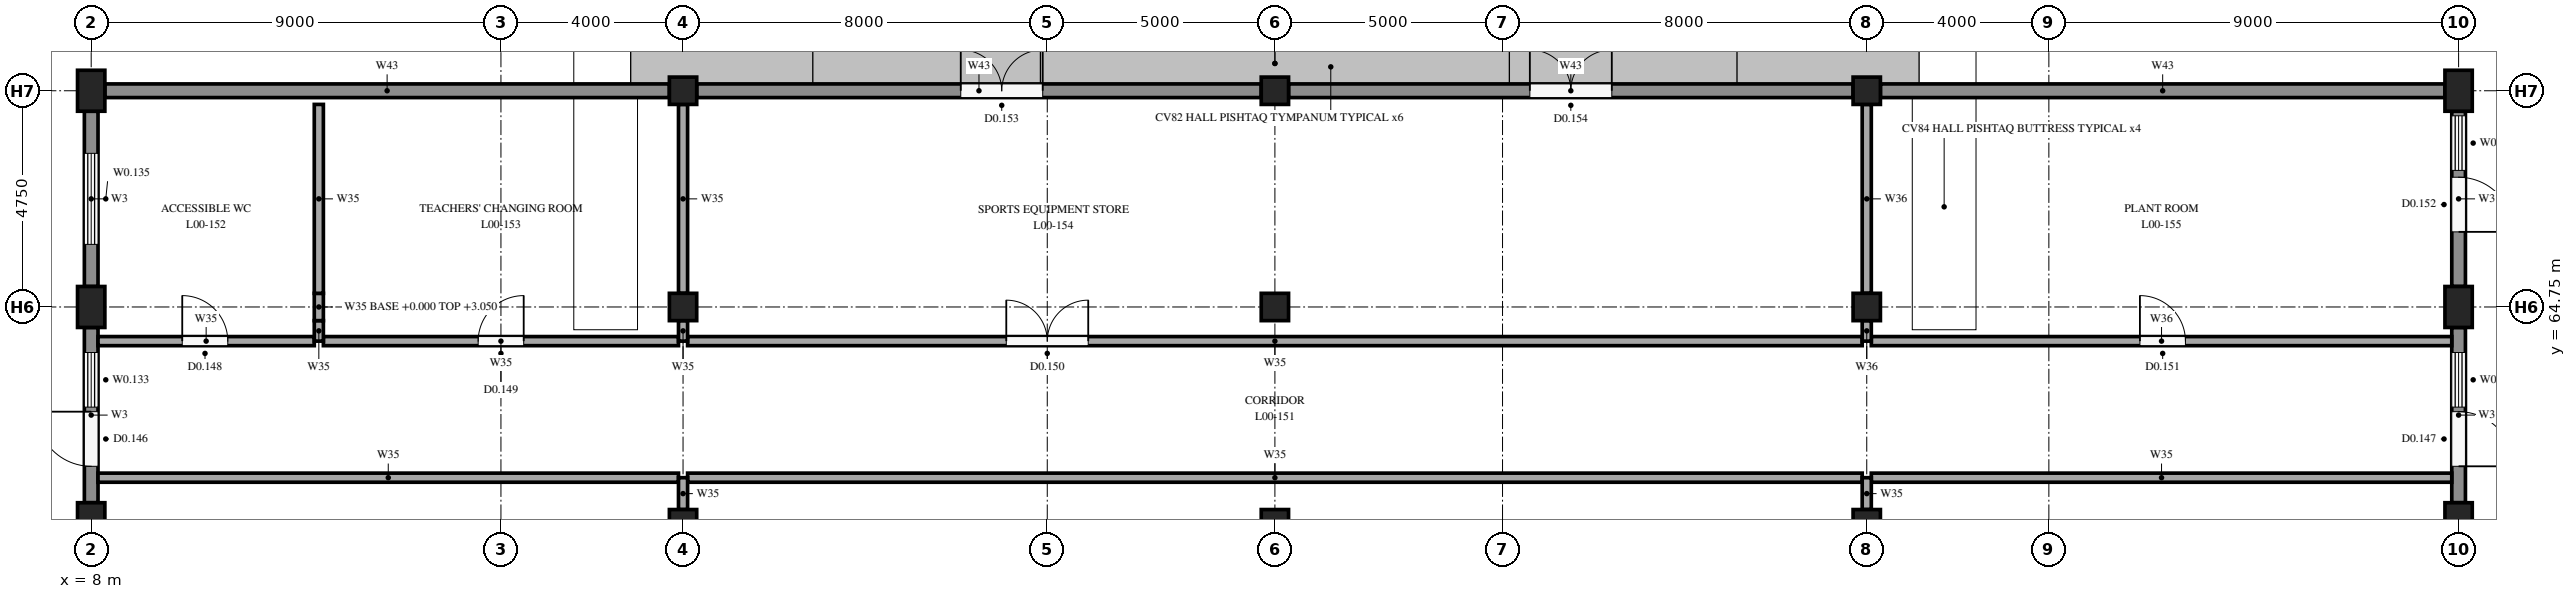
"""IFC4 building model, lengths in metres.
Left out: names, types, materials, properties, quantities, classifications, styles, units other than length and angle.
Written with IfcOpenShell. Run it as: python <this file> out.ifc"""

import sys

from ifc_helpers import new_model, si_unit, direction, frame, frame_2d, origin, origin_2d, place, context, subcontext, project, spatial, rectangle, extrude, element, fill, save


model = new_model("IFC4")
c1 = context("Model", 3, precision=1e-05, world=origin(), true_north=direction((0.0, 1.0)))
c2 = subcontext(c1, "Body", "Model", "MODEL_VIEW")
j1 = project(units=[si_unit("LENGTHUNIT", "METRE"), si_unit("PLANEANGLEUNIT", "RADIAN")], contexts=[c1])
p1 = place(None, origin())
s1 = spatial("IfcSite", under=j1, at=p1, CompositionType="ELEMENT")
p2 = place(p1, origin())
s2 = spatial("IfcBuilding", under=s1, at=p2, CompositionType="ELEMENT")
p3 = place(p2, origin())
s3 = spatial("IfcBuildingStorey", under=s2, at=p3, CompositionType="ELEMENT", Elevation=0.0)
for number, where, z_axis, x_axis in (
    (1, (8.0, 60.0, 0.0), (0.0, 0.0, 1.0), (1.0, 0.0, 0.0)),
    (2, (8.0, 64.75, 0.0), (0.0, 0.0, 1.0), (1.0, 0.0, 0.0)),
    (3, (8.0, 69.5, 0.0), (0.0, 0.0, 1.0), (1.0, 0.0, 0.0)),
    (4, (60.0, 60.0, 0.0), (0.0, 0.0, 1.0), (1.0, 0.0, 0.0)),
    (5, (60.0, 64.75, 0.0), (0.0, 0.0, 1.0), (1.0, 0.0, 0.0)),
    (6, (60.0, 69.5, 0.0), (0.0, 0.0, 1.0), (1.0, 0.0, 0.0)),
):
    element("IfcColumn", number, at=place(p3, frame(where, z_axis=z_axis, x_axis=x_axis)), inside=s3, PredefinedType="COLUMN", context=c2, shape_type="SweptSolid", body=[
        extrude(rectangle(XDim=0.6, YDim=0.9, at=origin_2d()), origin(), (0.0, 0.0, 1.0), 4.5),
    ])
for number, where, z_axis, x_axis in (
    (7, (21.0, 60.0, 0.0), (0.0, 0.0, 1.0), (1.0, 0.0, 0.0)),
    (8, (21.0, 64.75, 0.0), (0.0, 0.0, 1.0), (1.0, 0.0, 0.0)),
    (9, (21.0, 69.5, 0.0), (0.0, 0.0, 1.0), (1.0, 0.0, 0.0)),
    (10, (34.0, 60.0, 0.0), (0.0, 0.0, 1.0), (1.0, 0.0, 0.0)),
    (11, (34.0, 64.75, 0.0), (0.0, 0.0, 1.0), (1.0, 0.0, 0.0)),
    (12, (34.0, 69.5, 0.0), (0.0, 0.0, 1.0), (1.0, 0.0, 0.0)),
    (13, (47.0, 60.0, 0.0), (0.0, 0.0, 1.0), (1.0, 0.0, 0.0)),
    (14, (47.0, 64.75, 0.0), (0.0, 0.0, 1.0), (1.0, 0.0, 0.0)),
    (15, (47.0, 69.5, 0.0), (0.0, 0.0, 1.0), (1.0, 0.0, 0.0)),
):
    element("IfcColumn", number, at=place(p3, frame(where, z_axis=z_axis, x_axis=x_axis)), inside=s3, PredefinedType="COLUMN", context=c2, shape_type="SweptSolid", body=[
        extrude(rectangle(XDim=0.6, YDim=0.6, at=origin_2d()), origin(), (0.0, 0.0, 1.0), 4.5),
    ])
p4 = place(p3, frame((8.0, 60.45, 0.0), z_axis=(0.0, 0.0, 1.0), x_axis=(0.0, 1.0, 0.0)))
e16 = element("IfcWall", 16, at=p4, inside=s3, PredefinedType="SOLIDWALL", context=c2, shape_type="SweptSolid", body=[
    extrude(rectangle(XDim=3.85, YDim=0.3, at=frame_2d((1.925, 0.0))), origin(), (0.0, 0.0, 1.0), 4.15),
])
p5 = place(p4, frame((2.1, 0.0, 1.0)))
e17 = element("IfcOpeningElement", 17, at=p5, cuts=e16, PredefinedType="OPENING", context=c2, shape_type="SweptSolid", body=[
    extrude(rectangle(XDim=1.2, YDim=2.0, at=frame_2d((0.6, 1.0))), frame((0.0, 0.16, 0.0), z_axis=(0.0, -1.0, 0.0), x_axis=(1.0, 0.0, 0.0)), (0.0, 0.0, 1.0), 0.32),
])
p6 = place(p4, frame((0.8, 0.0, 0.0)))
e18 = element("IfcOpeningElement", 18, at=p6, cuts=e16, PredefinedType="OPENING", context=c2, shape_type="SweptSolid", body=[
    extrude(rectangle(XDim=1.2, YDim=2.1, at=frame_2d((0.6, 1.05))), frame((0.0, 0.16, 0.0), z_axis=(0.0, -1.0, 0.0), x_axis=(1.0, 0.0, 0.0)), (0.0, 0.0, 1.0), 0.32),
])
p7 = place(p3, frame((8.0, 65.2, 0.0), z_axis=(0.0, 0.0, 1.0), x_axis=(0.0, 1.0, 0.0)))
e19 = element("IfcWall", 19, at=p7, inside=s3, PredefinedType="SOLIDWALL", context=c2, shape_type="SweptSolid", body=[
    extrude(rectangle(XDim=3.85, YDim=0.3, at=frame_2d((1.925, 0.0))), origin(), (0.0, 0.0, 1.0), 4.15),
])
p8 = place(p7, frame((0.925, 0.0, 1.0)))
e20 = element("IfcOpeningElement", 20, at=p8, cuts=e19, PredefinedType="OPENING", context=c2, shape_type="SweptSolid", body=[
    extrude(rectangle(XDim=2.0, YDim=2.0, at=frame_2d((1.0, 1.0))), frame((0.0, 0.16, 0.0), z_axis=(0.0, -1.0, 0.0), x_axis=(1.0, 0.0, 0.0)), (0.0, 0.0, 1.0), 0.32),
])
p9 = place(p3, frame((60.0, 60.45, 0.0), z_axis=(0.0, 0.0, 1.0), x_axis=(0.0, 1.0, 0.0)))
e21 = element("IfcWall", 21, at=p9, inside=s3, PredefinedType="SOLIDWALL", context=c2, shape_type="SweptSolid", body=[
    extrude(rectangle(XDim=3.85, YDim=0.3, at=frame_2d((1.925, 0.0))), origin(), (0.0, 0.0, 1.0), 4.15),
])
p10 = place(p9, frame((2.1, 0.0, 1.0)))
e22 = element("IfcOpeningElement", 22, at=p10, cuts=e21, PredefinedType="OPENING", context=c2, shape_type="SweptSolid", body=[
    extrude(rectangle(XDim=1.2, YDim=2.0, at=frame_2d((0.6, 1.0))), frame((0.0, 0.16, 0.0), z_axis=(0.0, -1.0, 0.0), x_axis=(1.0, 0.0, 0.0)), (0.0, 0.0, 1.0), 0.32),
])
p11 = place(p9, frame((0.8, 0.0, 0.0)))
e23 = element("IfcOpeningElement", 23, at=p11, cuts=e21, PredefinedType="OPENING", context=c2, shape_type="SweptSolid", body=[
    extrude(rectangle(XDim=1.2, YDim=2.1, at=frame_2d((0.6, 1.05))), frame((0.0, 0.16, 0.0), z_axis=(0.0, -1.0, 0.0), x_axis=(1.0, 0.0, 0.0)), (0.0, 0.0, 1.0), 0.32),
])
p12 = place(p3, frame((60.0, 65.2, 0.0), z_axis=(0.0, 0.0, 1.0), x_axis=(0.0, 1.0, 0.0)))
e24 = element("IfcWall", 24, at=p12, inside=s3, PredefinedType="SOLIDWALL", context=c2, shape_type="SweptSolid", body=[
    extrude(rectangle(XDim=3.85, YDim=0.3, at=frame_2d((1.925, 0.0))), origin(), (0.0, 0.0, 1.0), 4.15),
])
p13 = place(p12, frame((2.55, 0.0, 1.0)))
e25 = element("IfcOpeningElement", 25, at=p13, cuts=e24, PredefinedType="OPENING", context=c2, shape_type="SweptSolid", body=[
    extrude(rectangle(XDim=1.2, YDim=2.0, at=frame_2d((0.6, 1.0))), frame((0.0, 0.16, 0.0), z_axis=(0.0, -1.0, 0.0), x_axis=(1.0, 0.0, 0.0)), (0.0, 0.0, 1.0), 0.32),
])
p14 = place(p12, frame((1.2, 0.0, 0.0)))
e26 = element("IfcOpeningElement", 26, at=p14, cuts=e24, PredefinedType="OPENING", context=c2, shape_type="SweptSolid", body=[
    extrude(rectangle(XDim=1.2, YDim=2.1, at=frame_2d((0.6, 1.05))), frame((0.0, 0.16, 0.0), z_axis=(0.0, -1.0, 0.0), x_axis=(1.0, 0.0, 0.0)), (0.0, 0.0, 1.0), 0.32),
])
p15 = place(p3, frame((8.3, 69.5, 0.0), z_axis=(0.0, 0.0, 1.0), x_axis=(1.0, 0.0, 0.0)))
e27 = element("IfcWall", 27, at=p15, inside=s3, PredefinedType="SOLIDWALL", context=c2, shape_type="SweptSolid", body=[
    extrude(rectangle(XDim=12.4, YDim=0.3, at=frame_2d((6.2, 0.0))), origin(), (0.0, 0.0, 1.0), 3.05),
])
p16 = place(p3, frame((21.3, 69.5, 0.0), z_axis=(0.0, 0.0, 1.0), x_axis=(1.0, 0.0, 0.0)))
e28 = element("IfcWall", 28, at=p16, inside=s3, PredefinedType="SOLIDWALL", context=c2, shape_type="SweptSolid", body=[
    extrude(rectangle(XDim=12.4, YDim=0.3, at=frame_2d((6.2, 0.0))), origin(), (0.0, 0.0, 1.0), 3.05),
])
p17 = place(p16, frame((5.8, 0.0, 0.0)))
e29 = element("IfcOpeningElement", 29, at=p17, cuts=e28, PredefinedType="OPENING", context=c2, shape_type="SweptSolid", body=[
    extrude(rectangle(XDim=1.8, YDim=2.1, at=frame_2d((0.9, 1.05))), frame((0.0, 0.16, 0.0), z_axis=(0.0, -1.0, 0.0), x_axis=(1.0, 0.0, 0.0)), (0.0, 0.0, 1.0), 0.32),
])
p18 = place(p3, frame((34.3, 69.5, 0.0), z_axis=(0.0, 0.0, 1.0), x_axis=(1.0, 0.0, 0.0)))
e30 = element("IfcWall", 30, at=p18, inside=s3, PredefinedType="SOLIDWALL", context=c2, shape_type="SweptSolid", body=[
    extrude(rectangle(XDim=12.4, YDim=0.3, at=frame_2d((6.2, 0.0))), origin(), (0.0, 0.0, 1.0), 3.05),
])
p19 = place(p18, frame((5.3, 0.0, 0.0)))
e31 = element("IfcOpeningElement", 31, at=p19, cuts=e30, PredefinedType="OPENING", context=c2, shape_type="SweptSolid", body=[
    extrude(rectangle(XDim=1.8, YDim=2.1, at=frame_2d((0.9, 1.05))), frame((0.0, 0.16, 0.0), z_axis=(0.0, -1.0, 0.0), x_axis=(1.0, 0.0, 0.0)), (0.0, 0.0, 1.0), 0.32),
])
p20 = place(p3, frame((47.3, 69.5, 0.0), z_axis=(0.0, 0.0, 1.0), x_axis=(1.0, 0.0, 0.0)))
e32 = element("IfcWall", 32, at=p20, inside=s3, PredefinedType="SOLIDWALL", context=c2, shape_type="SweptSolid", body=[
    extrude(rectangle(XDim=12.4, YDim=0.3, at=frame_2d((6.2, 0.0))), origin(), (0.0, 0.0, 1.0), 3.05),
])
p21 = place(p3, frame((8.15, 61.0, 0.0), z_axis=(0.0, 0.0, 1.0), x_axis=(1.0, 0.0, 0.0)))
e33 = element("IfcWall", 33, at=p21, inside=s3, PredefinedType="PARTITIONING", context=c2, shape_type="SweptSolid", body=[
    extrude(rectangle(XDim=12.75, YDim=0.2, at=frame_2d((6.375, 0.0))), origin(), (0.0, 0.0, 1.0), 4.15),
])
p22 = place(p3, frame((21.1, 61.0, 0.0), z_axis=(0.0, 0.0, 1.0), x_axis=(1.0, 0.0, 0.0)))
e34 = element("IfcWall", 34, at=p22, inside=s3, PredefinedType="PARTITIONING", context=c2, shape_type="SweptSolid", body=[
    extrude(rectangle(XDim=25.8, YDim=0.2, at=frame_2d((12.9, 0.0))), origin(), (0.0, 0.0, 1.0), 4.15),
])
p23 = place(p3, frame((47.1, 61.0, 0.0), z_axis=(0.0, 0.0, 1.0), x_axis=(1.0, 0.0, 0.0)))
e35 = element("IfcWall", 35, at=p23, inside=s3, PredefinedType="PARTITIONING", context=c2, shape_type="SweptSolid", body=[
    extrude(rectangle(XDim=12.75, YDim=0.2, at=frame_2d((6.375, 0.0))), origin(), (0.0, 0.0, 1.0), 4.15),
])
p24 = place(p3, frame((8.15, 64.0, 0.0), z_axis=(0.0, 0.0, 1.0), x_axis=(1.0, 0.0, 0.0)))
e36 = element("IfcWall", 36, at=p24, inside=s3, PredefinedType="PARTITIONING", context=c2, shape_type="SweptSolid", body=[
    extrude(rectangle(XDim=4.75, YDim=0.2, at=frame_2d((2.375, 0.0))), origin(), (0.0, 0.0, 1.0), 4.15),
])
p25 = place(p24, frame((1.85, 0.0, 0.0)))
e37 = element("IfcOpeningElement", 37, at=p25, cuts=e36, PredefinedType="OPENING", context=c2, shape_type="SweptSolid", body=[
    extrude(rectangle(XDim=1.0, YDim=2.1, at=frame_2d((0.5, 1.05))), frame((0.0, 0.11, 0.0), z_axis=(0.0, -1.0, 0.0), x_axis=(1.0, 0.0, 0.0)), (0.0, 0.0, 1.0), 0.22),
])
p26 = place(p3, frame((13.1, 64.0, 0.0), z_axis=(0.0, 0.0, 1.0), x_axis=(1.0, 0.0, 0.0)))
e38 = element("IfcWall", 38, at=p26, inside=s3, PredefinedType="PARTITIONING", context=c2, shape_type="SweptSolid", body=[
    extrude(rectangle(XDim=7.8, YDim=0.2, at=frame_2d((3.9, 0.0))), origin(), (0.0, 0.0, 1.0), 4.15),
])
p27 = place(p26, frame((3.4, 0.0, 0.0)))
e39 = element("IfcOpeningElement", 39, at=p27, cuts=e38, PredefinedType="OPENING", context=c2, shape_type="SweptSolid", body=[
    extrude(rectangle(XDim=1.0, YDim=2.1, at=frame_2d((0.5, 1.05))), frame((0.0, 0.11, 0.0), z_axis=(0.0, -1.0, 0.0), x_axis=(1.0, 0.0, 0.0)), (0.0, 0.0, 1.0), 0.22),
])
p28 = place(p3, frame((21.1, 64.0, 0.0), z_axis=(0.0, 0.0, 1.0), x_axis=(1.0, 0.0, 0.0)))
e40 = element("IfcWall", 40, at=p28, inside=s3, PredefinedType="PARTITIONING", context=c2, shape_type="SweptSolid", body=[
    extrude(rectangle(XDim=25.8, YDim=0.2, at=frame_2d((12.9, 0.0))), origin(), (0.0, 0.0, 1.0), 4.15),
])
p29 = place(p28, frame((7.0, 0.0, 0.0)))
e41 = element("IfcOpeningElement", 41, at=p29, cuts=e40, PredefinedType="OPENING", context=c2, shape_type="SweptSolid", body=[
    extrude(rectangle(XDim=1.8, YDim=2.1, at=frame_2d((0.9, 1.05))), frame((0.0, 0.11, 0.0), z_axis=(0.0, -1.0, 0.0), x_axis=(1.0, 0.0, 0.0)), (0.0, 0.0, 1.0), 0.22),
])
p30 = place(p3, frame((47.1, 64.0, 0.0), z_axis=(0.0, 0.0, 1.0), x_axis=(1.0, 0.0, 0.0)))
e42 = element("IfcWall", 42, at=p30, inside=s3, PredefinedType="PARTITIONING", context=c2, shape_type="SweptSolid", body=[
    extrude(rectangle(XDim=12.75, YDim=0.2, at=frame_2d((6.375, 0.0))), origin(), (0.0, 0.0, 1.0), 4.15),
])
p31 = place(p30, frame((5.9, 0.0, 0.0)))
e43 = element("IfcOpeningElement", 43, at=p31, cuts=e42, PredefinedType="OPENING", context=c2, shape_type="SweptSolid", body=[
    extrude(rectangle(XDim=1.0, YDim=2.1, at=frame_2d((0.5, 1.05))), frame((0.0, 0.11, 0.0), z_axis=(0.0, -1.0, 0.0), x_axis=(1.0, 0.0, 0.0)), (0.0, 0.0, 1.0), 0.22),
])
p32 = place(p3, frame((13.0, 64.0, 0.0), z_axis=(0.0, 0.0, 1.0), x_axis=(0.0, 1.0, 0.0)))
e44 = element("IfcWall", 44, at=p32, inside=s3, PredefinedType="PARTITIONING", context=c2, shape_type="SweptSolid", body=[
    extrude(rectangle(XDim=0.45, YDim=0.2, at=frame_2d((0.225, 0.0))), origin(), (0.0, 0.0, 1.0), 4.15),
])
p33 = place(p3, frame((13.0, 64.45, 0.0), z_axis=(0.0, 0.0, 1.0), x_axis=(0.0, 1.0, 0.0)))
e45 = element("IfcWall", 45, at=p33, inside=s3, PredefinedType="PARTITIONING", context=c2, shape_type="SweptSolid", body=[
    extrude(rectangle(XDim=0.6, YDim=0.2, at=frame_2d((0.3, 0.0))), origin(), (0.0, 0.0, 1.0), 3.05),
])
p34 = place(p3, frame((13.0, 65.05, 0.0), z_axis=(0.0, 0.0, 1.0), x_axis=(0.0, 1.0, 0.0)))
e46 = element("IfcWall", 46, at=p34, inside=s3, PredefinedType="PARTITIONING", context=c2, shape_type="SweptSolid", body=[
    extrude(rectangle(XDim=4.15, YDim=0.2, at=frame_2d((2.075, 0.0))), origin(), (0.0, 0.0, 1.0), 4.15),
])
p35 = place(p3, frame((21.0, 60.3, 0.0), z_axis=(0.0, 0.0, 1.0), x_axis=(0.0, 1.0, 0.0)))
e47 = element("IfcWall", 47, at=p35, inside=s3, PredefinedType="PARTITIONING", context=c2, shape_type="SweptSolid", body=[
    extrude(rectangle(XDim=0.7, YDim=0.2, at=frame_2d((0.35, 0.0))), origin(), (0.0, 0.0, 1.0), 4.15),
])
p36 = place(p3, frame((21.0, 64.0, 0.0), z_axis=(0.0, 0.0, 1.0), x_axis=(0.0, 1.0, 0.0)))
e48 = element("IfcWall", 48, at=p36, inside=s3, PredefinedType="PARTITIONING", context=c2, shape_type="SweptSolid", body=[
    extrude(rectangle(XDim=0.45, YDim=0.2, at=frame_2d((0.225, 0.0))), origin(), (0.0, 0.0, 1.0), 4.15),
])
p37 = place(p3, frame((21.0, 65.05, 0.0), z_axis=(0.0, 0.0, 1.0), x_axis=(0.0, 1.0, 0.0)))
e49 = element("IfcWall", 49, at=p37, inside=s3, PredefinedType="PARTITIONING", context=c2, shape_type="SweptSolid", body=[
    extrude(rectangle(XDim=4.15, YDim=0.2, at=frame_2d((2.075, 0.0))), origin(), (0.0, 0.0, 1.0), 4.15),
])
p38 = place(p3, frame((47.0, 60.3, 0.0), z_axis=(0.0, 0.0, 1.0), x_axis=(0.0, 1.0, 0.0)))
e50 = element("IfcWall", 50, at=p38, inside=s3, PredefinedType="PARTITIONING", context=c2, shape_type="SweptSolid", body=[
    extrude(rectangle(XDim=0.7, YDim=0.2, at=frame_2d((0.35, 0.0))), origin(), (0.0, 0.0, 1.0), 4.15),
])
p39 = place(p3, frame((47.0, 64.0, 0.0), z_axis=(0.0, 0.0, 1.0), x_axis=(0.0, 1.0, 0.0)))
e51 = element("IfcWall", 51, at=p39, inside=s3, PredefinedType="PARTITIONING", context=c2, shape_type="SweptSolid", body=[
    extrude(rectangle(XDim=0.45, YDim=0.2, at=frame_2d((0.225, 0.0))), origin(), (0.0, 0.0, 1.0), 4.15),
])
p40 = place(p3, frame((47.0, 65.05, 0.0), z_axis=(0.0, 0.0, 1.0), x_axis=(0.0, 1.0, 0.0)))
e52 = element("IfcWall", 52, at=p40, inside=s3, PredefinedType="PARTITIONING", context=c2, shape_type="SweptSolid", body=[
    extrude(rectangle(XDim=4.15, YDim=0.2, at=frame_2d((2.075, 0.0))), origin(), (0.0, 0.0, 1.0), 4.15),
])
p41 = place(p5, origin())
e53 = element("IfcWindow", 53, at=p41, inside=s3, PartitioningType="SINGLE_PANEL", PredefinedType="WINDOW", context=c2, shape_type="SweptSolid", body=[
    extrude(rectangle(XDim=1.2, YDim=2.0, at=frame_2d((0.6, 1.0))), frame((0.0, 0.03, 0.0), z_axis=(0.0, -1.0, 0.0), x_axis=(1.0, 0.0, 0.0)), (0.0, 0.0, 1.0), 0.06),
])
fill(e17, e53)
p42 = place(p8, origin())
e54 = element("IfcWindow", 54, at=p42, inside=s3, PartitioningType="SINGLE_PANEL", PredefinedType="WINDOW", context=c2, shape_type="SweptSolid", body=[
    extrude(rectangle(XDim=2.0, YDim=2.0, at=frame_2d((1.0, 1.0))), frame((0.0, 0.03, 0.0), z_axis=(0.0, -1.0, 0.0), x_axis=(1.0, 0.0, 0.0)), (0.0, 0.0, 1.0), 0.06),
])
fill(e20, e54)
p43 = place(p10, origin())
e55 = element("IfcWindow", 55, at=p43, inside=s3, PartitioningType="SINGLE_PANEL", PredefinedType="WINDOW", context=c2, shape_type="SweptSolid", body=[
    extrude(rectangle(XDim=1.2, YDim=2.0, at=frame_2d((0.6, 1.0))), frame((0.0, 0.03, 0.0), z_axis=(0.0, -1.0, 0.0), x_axis=(1.0, 0.0, 0.0)), (0.0, 0.0, 1.0), 0.06),
])
fill(e22, e55)
p44 = place(p13, origin())
e56 = element("IfcWindow", 56, at=p44, inside=s3, PartitioningType="SINGLE_PANEL", PredefinedType="WINDOW", context=c2, shape_type="SweptSolid", body=[
    extrude(rectangle(XDim=1.2, YDim=2.0, at=frame_2d((0.6, 1.0))), frame((0.0, 0.03, 0.0), z_axis=(0.0, -1.0, 0.0), x_axis=(1.0, 0.0, 0.0)), (0.0, 0.0, 1.0), 0.06),
])
fill(e25, e56)
p45 = place(p6, origin())
e57 = element("IfcDoor", 57, at=p45, inside=s3, OperationType="SINGLE_SWING_RIGHT", PredefinedType="DOOR", context=c2, shape_type="SweptSolid", body=[
    extrude(rectangle(XDim=1.2, YDim=2.1, at=frame_2d((0.6, 1.05))), frame((0.0, 0.025, 0.0), z_axis=(0.0, -1.0, 0.0), x_axis=(1.0, 0.0, 0.0)), (0.0, 0.0, 1.0), 0.05),
])
fill(e18, e57)
p46 = place(p11, frame((1.2, 0.0, 0.0), z_axis=(0.0, 0.0, 1.0), x_axis=(-1.0, 0.0, 0.0)))
e58 = element("IfcDoor", 58, at=p46, inside=s3, OperationType="SINGLE_SWING_LEFT", PredefinedType="DOOR", context=c2, shape_type="SweptSolid", body=[
    extrude(rectangle(XDim=1.2, YDim=2.1, at=frame_2d((0.6, 1.05))), frame((0.0, 0.025, 0.0), z_axis=(0.0, -1.0, 0.0), x_axis=(1.0, 0.0, 0.0)), (0.0, 0.0, 1.0), 0.05),
])
fill(e23, e58)
p47 = place(p14, frame((1.2, 0.0, 0.0), z_axis=(0.0, 0.0, 1.0), x_axis=(-1.0, 0.0, 0.0)))
e59 = element("IfcDoor", 59, at=p47, inside=s3, OperationType="SINGLE_SWING_LEFT", PredefinedType="DOOR", context=c2, shape_type="SweptSolid", body=[
    extrude(rectangle(XDim=1.2, YDim=2.1, at=frame_2d((0.6, 1.05))), frame((0.0, 0.025, 0.0), z_axis=(0.0, -1.0, 0.0), x_axis=(1.0, 0.0, 0.0)), (0.0, 0.0, 1.0), 0.05),
])
fill(e26, e59)
p48 = place(p17, origin())
e60 = element("IfcDoor", 60, at=p48, inside=s3, OperationType="DOUBLE_DOOR_SINGLE_SWING", PredefinedType="DOOR", context=c2, shape_type="SweptSolid", body=[
    extrude(rectangle(XDim=1.8, YDim=2.1, at=frame_2d((0.9, 1.05))), frame((0.0, 0.025, 0.0), z_axis=(0.0, -1.0, 0.0), x_axis=(1.0, 0.0, 0.0)), (0.0, 0.0, 1.0), 0.05),
])
fill(e29, e60)
p49 = place(p19, origin())
e61 = element("IfcDoor", 61, at=p49, inside=s3, OperationType="DOUBLE_DOOR_SINGLE_SWING", PredefinedType="DOOR", context=c2, shape_type="SweptSolid", body=[
    extrude(rectangle(XDim=1.8, YDim=2.1, at=frame_2d((0.9, 1.05))), frame((0.0, 0.025, 0.0), z_axis=(0.0, -1.0, 0.0), x_axis=(1.0, 0.0, 0.0)), (0.0, 0.0, 1.0), 0.05),
])
fill(e31, e61)
p50 = place(p25, origin())
e62 = element("IfcDoor", 62, at=p50, inside=s3, OperationType="SINGLE_SWING_LEFT", PredefinedType="DOOR", context=c2, shape_type="SweptSolid", body=[
    extrude(rectangle(XDim=1.0, YDim=2.1, at=frame_2d((0.5, 1.05))), frame((0.0, 0.025, 0.0), z_axis=(0.0, -1.0, 0.0), x_axis=(1.0, 0.0, 0.0)), (0.0, 0.0, 1.0), 0.05),
])
fill(e37, e62)
p51 = place(p27, origin())
e63 = element("IfcDoor", 63, at=p51, inside=s3, OperationType="SINGLE_SWING_RIGHT", PredefinedType="DOOR", context=c2, shape_type="SweptSolid", body=[
    extrude(rectangle(XDim=1.0, YDim=2.1, at=frame_2d((0.5, 1.05))), frame((0.0, 0.025, 0.0), z_axis=(0.0, -1.0, 0.0), x_axis=(1.0, 0.0, 0.0)), (0.0, 0.0, 1.0), 0.05),
])
fill(e39, e63)
p52 = place(p29, origin())
e64 = element("IfcDoor", 64, at=p52, inside=s3, OperationType="DOUBLE_DOOR_SINGLE_SWING", PredefinedType="DOOR", context=c2, shape_type="SweptSolid", body=[
    extrude(rectangle(XDim=1.8, YDim=2.1, at=frame_2d((0.9, 1.05))), frame((0.0, 0.025, 0.0), z_axis=(0.0, -1.0, 0.0), x_axis=(1.0, 0.0, 0.0)), (0.0, 0.0, 1.0), 0.05),
])
fill(e41, e64)
p53 = place(p31, origin())
e65 = element("IfcDoor", 65, at=p53, inside=s3, OperationType="SINGLE_SWING_LEFT", PredefinedType="DOOR", context=c2, shape_type="SweptSolid", body=[
    extrude(rectangle(XDim=1.0, YDim=2.1, at=frame_2d((0.5, 1.05))), frame((0.0, 0.025, 0.0), z_axis=(0.0, -1.0, 0.0), x_axis=(1.0, 0.0, 0.0)), (0.0, 0.0, 1.0), 0.05),
])
fill(e43, e65)
save(model, sys.argv[1])
